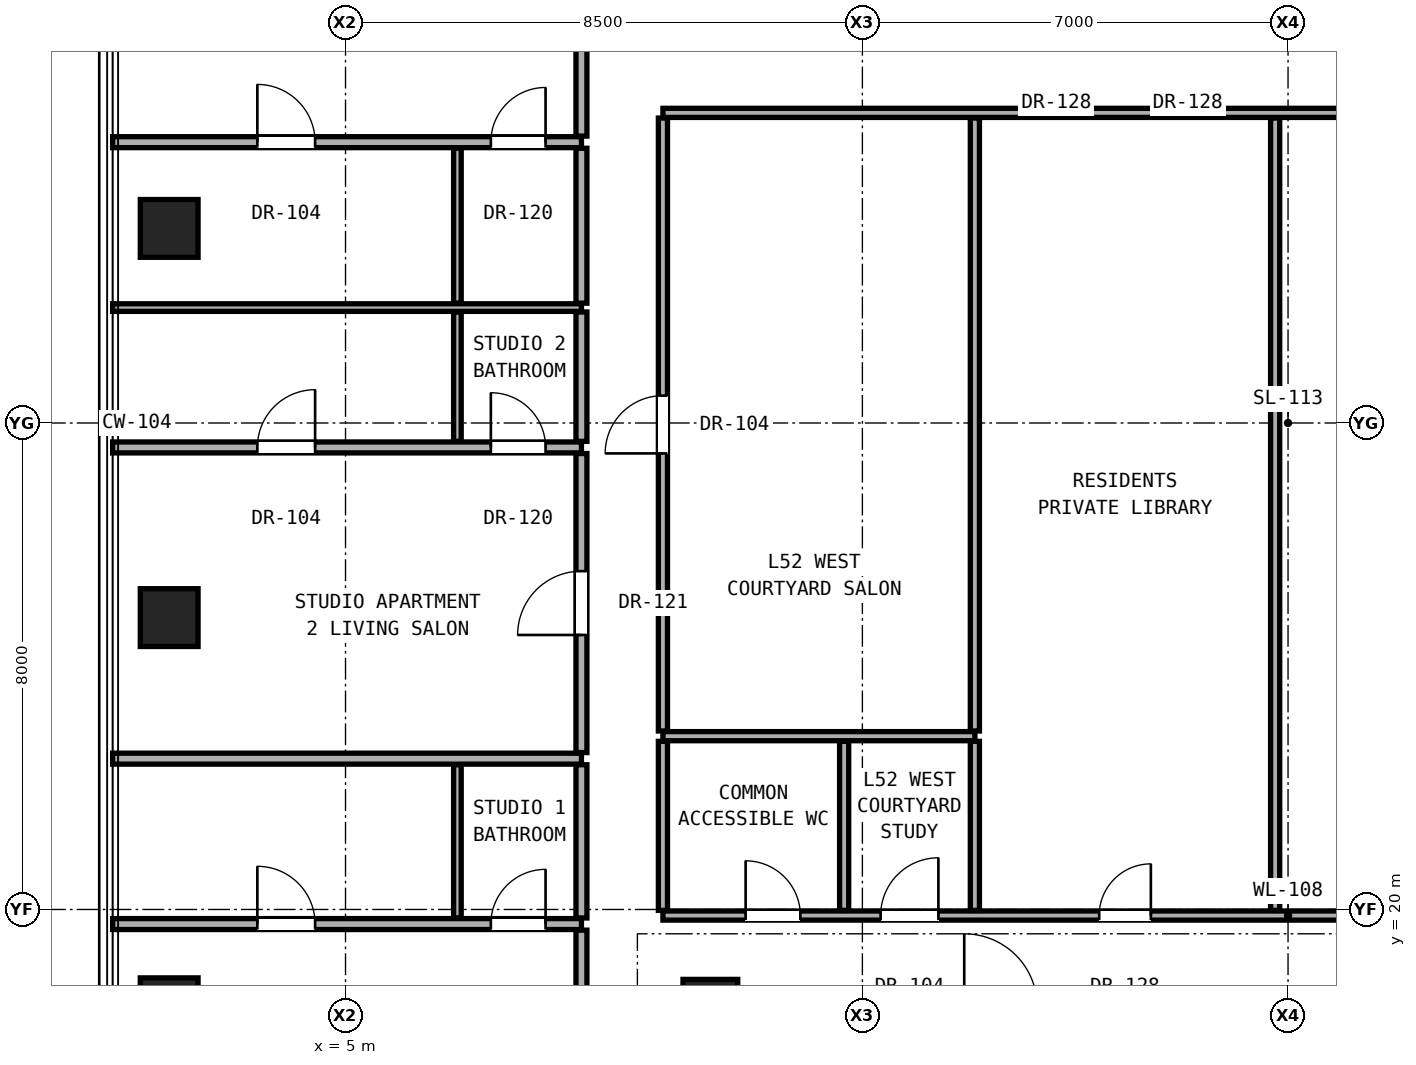
"""IFC4 building model, lengths in metres.
Left out: names, types, materials, properties, quantities, classifications, styles, units other than length and angle.
Written with IfcOpenShell. Run it as: python <this file> out.ifc"""

import sys

from ifc_helpers import new_model, si_unit, direction, frame, frame_2d, origin, origin_2d, place, context, subcontext, project, spatial, rectangle, hollow_rectangle, extrude, element, fill, save


model = new_model("IFC4")
c1 = context("Model", 3, precision=1e-05, world=origin(), true_north=direction((0.0, 1.0)))
c2 = subcontext(c1, "Body", "Model", "MODEL_VIEW")
j1 = project(units=[si_unit("LENGTHUNIT", "METRE"), si_unit("PLANEANGLEUNIT", "RADIAN")], contexts=[c1])
p1 = place(None, origin())
s1 = spatial("IfcSite", under=j1, at=p1, CompositionType="ELEMENT")
p2 = place(p1, origin())
s2 = spatial("IfcBuilding", under=s1, at=p2, CompositionType="ELEMENT")
p3 = place(p2, frame((0.0, 0.0, 183.65)))
s3 = spatial("IfcBuildingStorey", under=s2, at=p3, CompositionType="ELEMENT", Elevation=183.65)
p4 = place(p3, frame((11.0, 18.4, 0.0), z_axis=(0.0, 0.0, 1.0), x_axis=(1.0, 0.0, 0.0)))
e1 = element("IfcColumn", 1, at=p4, inside=s3, PredefinedType="COLUMN", context=c2, shape_type="SweptSolid", body=[
    extrude(rectangle(XDim=0.9, YDim=0.9, at=origin_2d()), origin(), (0.0, 0.0, 1.0), 3.25),
])
for number, where, z_axis, x_axis in (
    (2, (2.1, 18.4, 0.0), (0.0, 0.0, 1.0), (1.0, 0.0, 0.0)),
    (3, (2.1, 24.8, 0.0), (0.0, 0.0, 1.0), (1.0, 0.0, 0.0)),
    (4, (2.1, 31.2, 0.0), (0.0, 0.0, 1.0), (1.0, 0.0, 0.0)),
):
    element("IfcColumn", number, at=place(p3, frame(where, z_axis=z_axis, x_axis=x_axis)), inside=s3, PredefinedType="COLUMN", context=c2, shape_type="SweptSolid", body=[
        extrude(hollow_rectangle(XDim=0.95, YDim=0.95, WallThickness=0.05, at=origin_2d()), origin(), (0.0, 0.0, 1.0), 3.25),
    ])
p5 = place(p3, frame((1.17, 19.76, 0.0), z_axis=(0.0, 0.0, 1.0), x_axis=(1.0, 0.0, 0.0)))
e5 = element("IfcWall", 5, at=p5, inside=s3, PredefinedType="PARTITIONING", context=c2, shape_type="SweptSolid", body=[
    extrude(rectangle(XDim=7.71, YDim=0.18, at=frame_2d((3.855, 0.0))), origin(), (0.0, 0.0, 1.0), 2.269),
])
p6 = place(p5, frame((2.38, 0.0, 0.0)))
e6 = element("IfcOpeningElement", 6, at=p6, cuts=e5, PredefinedType="OPENING", context=c2, shape_type="SweptSolid", body=[
    extrude(rectangle(XDim=0.95, YDim=2.15, at=frame_2d((0.475, 1.075))), frame((0.0, 0.1, 0.0), z_axis=(0.0, -1.0, 0.0), x_axis=(1.0, 0.0, 0.0)), (0.0, 0.0, 1.0), 0.2),
])
p7 = place(p5, frame((6.22, 0.0, 0.0)))
e7 = element("IfcOpeningElement", 7, at=p7, cuts=e5, PredefinedType="OPENING", context=c2, shape_type="SweptSolid", body=[
    extrude(rectangle(XDim=0.9, YDim=2.1, at=frame_2d((0.45, 1.05))), frame((0.0, 0.1, 0.0), z_axis=(0.0, -1.0, 0.0), x_axis=(1.0, 0.0, 0.0)), (0.0, 0.0, 1.0), 0.2),
])
p8 = place(p3, frame((10.22, 19.9, 0.0), z_axis=(0.0, 0.0, 1.0), x_axis=(1.0, 0.0, 0.0)))
e8 = element("IfcWall", 8, at=p8, inside=s3, PredefinedType="PARTITIONING", context=c2, shape_type="SweptSolid", body=[
    extrude(rectangle(XDim=20.56, YDim=0.15, at=frame_2d((10.28, 0.0))), origin(), (0.0, 0.0, 1.0), 2.186),
])
p9 = place(p8, frame((1.36, 0.0, 0.0)))
e9 = element("IfcOpeningElement", 9, at=p9, cuts=e8, PredefinedType="OPENING", context=c2, shape_type="SweptSolid", body=[
    extrude(rectangle(XDim=0.9, YDim=2.1, at=frame_2d((0.45, 1.05))), frame((0.0, 0.085, 0.0), z_axis=(0.0, -1.0, 0.0), x_axis=(1.0, 0.0, 0.0)), (0.0, 0.0, 1.0), 0.17),
])
p10 = place(p8, frame((3.58, 0.0, 0.0)))
e10 = element("IfcOpeningElement", 10, at=p10, cuts=e8, PredefinedType="OPENING", context=c2, shape_type="SweptSolid", body=[
    extrude(rectangle(XDim=0.95, YDim=2.15, at=frame_2d((0.475, 1.075))), frame((0.0, 0.085, 0.0), z_axis=(0.0, -1.0, 0.0), x_axis=(1.0, 0.0, 0.0)), (0.0, 0.0, 1.0), 0.17),
])
p11 = place(p8, frame((7.174, 0.0, 0.0)))
e11 = element("IfcOpeningElement", 11, at=p11, cuts=e8, PredefinedType="OPENING", context=c2, shape_type="SweptSolid", body=[
    extrude(rectangle(XDim=0.85, YDim=2.01, at=frame_2d((0.425, 1.005))), frame((0.0, 0.085, 0.0), z_axis=(0.0, -1.0, 0.0), x_axis=(1.0, 0.0, 0.0)), (0.0, 0.0, 1.0), 0.17),
])
p12 = place(p3, frame((1.17, 22.48, 0.0), z_axis=(0.0, 0.0, 1.0), x_axis=(1.0, 0.0, 0.0)))
e12 = element("IfcWall", 12, at=p12, inside=s3, PredefinedType="PARTITIONING", context=c2, shape_type="SweptSolid", body=[
    extrude(rectangle(XDim=7.71, YDim=0.18, at=frame_2d((3.855, 0.0))), origin(), (0.0, 0.0, 1.0), 2.269),
])
p13 = place(p3, frame((10.22, 22.85, 0.0), z_axis=(0.0, 0.0, 1.0), x_axis=(1.0, 0.0, 0.0)))
e13 = element("IfcWall", 13, at=p13, inside=s3, PredefinedType="PARTITIONING", context=c2, shape_type="SweptSolid", body=[
    extrude(rectangle(XDim=5.13, YDim=0.15, at=frame_2d((2.565, 0.0))), origin(), (0.0, 0.0, 1.0), 2.186),
])
p14 = place(p3, frame((1.17, 27.598, 0.0), z_axis=(0.0, 0.0, 1.0), x_axis=(1.0, 0.0, 0.0)))
e14 = element("IfcWall", 14, at=p14, inside=s3, PredefinedType="PARTITIONING", context=c2, shape_type="SweptSolid", body=[
    extrude(rectangle(XDim=7.71, YDim=0.18, at=frame_2d((3.855, 0.0))), origin(), (0.0, 0.0, 1.0), 2.269),
])
p15 = place(p14, frame((2.38, 0.0, 0.0)))
e15 = element("IfcOpeningElement", 15, at=p15, cuts=e14, PredefinedType="OPENING", context=c2, shape_type="SweptSolid", body=[
    extrude(rectangle(XDim=0.95, YDim=2.15, at=frame_2d((0.475, 1.075))), frame((0.0, 0.1, 0.0), z_axis=(0.0, -1.0, 0.0), x_axis=(1.0, 0.0, 0.0)), (0.0, 0.0, 1.0), 0.2),
])
p16 = place(p14, frame((6.22, 0.0, 0.0)))
e16 = element("IfcOpeningElement", 16, at=p16, cuts=e14, PredefinedType="OPENING", context=c2, shape_type="SweptSolid", body=[
    extrude(rectangle(XDim=0.9, YDim=2.1, at=frame_2d((0.45, 1.05))), frame((0.0, 0.1, 0.0), z_axis=(0.0, -1.0, 0.0), x_axis=(1.0, 0.0, 0.0)), (0.0, 0.0, 1.0), 0.2),
])
p17 = place(p3, frame((1.17, 29.898, 0.0), z_axis=(0.0, 0.0, 1.0), x_axis=(1.0, 0.0, 0.0)))
e17 = element("IfcWall", 17, at=p17, inside=s3, PredefinedType="PARTITIONING", context=c2, shape_type="SweptSolid", body=[
    extrude(rectangle(XDim=7.71, YDim=0.125, at=frame_2d((3.855, 0.0))), origin(), (0.0, 0.0, 1.0), 2.269),
])
p18 = place(p3, frame((1.17, 32.618, 0.0), z_axis=(0.0, 0.0, 1.0), x_axis=(1.0, 0.0, 0.0)))
e18 = element("IfcWall", 18, at=p18, inside=s3, PredefinedType="PARTITIONING", context=c2, shape_type="SweptSolid", body=[
    extrude(rectangle(XDim=7.71, YDim=0.18, at=frame_2d((3.855, 0.0))), origin(), (0.0, 0.0, 1.0), 2.269),
])
p19 = place(p18, frame((2.38, 0.0, 0.0)))
e19 = element("IfcOpeningElement", 19, at=p19, cuts=e18, PredefinedType="OPENING", context=c2, shape_type="SweptSolid", body=[
    extrude(rectangle(XDim=0.95, YDim=2.15, at=frame_2d((0.475, 1.075))), frame((0.0, 0.1, 0.0), z_axis=(0.0, -1.0, 0.0), x_axis=(1.0, 0.0, 0.0)), (0.0, 0.0, 1.0), 0.2),
])
p20 = place(p18, frame((6.22, 0.0, 0.0)))
e20 = element("IfcOpeningElement", 20, at=p20, cuts=e18, PredefinedType="OPENING", context=c2, shape_type="SweptSolid", body=[
    extrude(rectangle(XDim=0.9, YDim=2.1, at=frame_2d((0.45, 1.05))), frame((0.0, 0.1, 0.0), z_axis=(0.0, -1.0, 0.0), x_axis=(1.0, 0.0, 0.0)), (0.0, 0.0, 1.0), 0.2),
])
p21 = place(p3, frame((10.22, 33.1, 0.0), z_axis=(0.0, 0.0, 1.0), x_axis=(1.0, 0.0, 0.0)))
e21 = element("IfcWall", 21, at=p21, inside=s3, PredefinedType="PARTITIONING", context=c2, shape_type="SweptSolid", body=[
    extrude(rectangle(XDim=20.56, YDim=0.15, at=frame_2d((10.28, 0.0))), origin(), (0.0, 0.0, 1.0), 2.186),
])
p22 = place(p21, frame((12.343, 0.0, 0.0)))
e22 = element("IfcOpeningElement", 22, at=p22, cuts=e21, PredefinedType="OPENING", context=c2, shape_type="SweptSolid", body=[
    extrude(rectangle(XDim=0.85, YDim=2.01, at=frame_2d((0.425, 1.005))), frame((0.0, 0.085, 0.0), z_axis=(0.0, -1.0, 0.0), x_axis=(1.0, 0.0, 0.0)), (0.0, 0.0, 1.0), 0.17),
])
p23 = place(p21, frame((17.569, 0.0, 0.0)))
e23 = element("IfcOpeningElement", 23, at=p23, cuts=e21, PredefinedType="OPENING", context=c2, shape_type="SweptSolid", body=[
    extrude(rectangle(XDim=0.85, YDim=2.01, at=frame_2d((0.425, 1.005))), frame((0.0, 0.085, 0.0), z_axis=(0.0, -1.0, 0.0), x_axis=(1.0, 0.0, 0.0)), (0.0, 0.0, 1.0), 0.17),
])
p24 = place(p3, frame((6.84, 19.86, 0.0), z_axis=(0.0, 0.0, 1.0), x_axis=(0.0, 1.0, 0.0)))
e24 = element("IfcWall", 24, at=p24, inside=s3, PredefinedType="PARTITIONING", context=c2, shape_type="SweptSolid", body=[
    extrude(rectangle(XDim=2.52, YDim=0.125, at=frame_2d((1.26, 0.0))), origin(), (0.0, 0.0, 1.0), 3.05),
])
p25 = place(p3, frame((6.84, 27.698, 0.0), z_axis=(0.0, 0.0, 1.0), x_axis=(0.0, 1.0, 0.0)))
e25 = element("IfcWall", 25, at=p25, inside=s3, PredefinedType="PARTITIONING", context=c2, shape_type="SweptSolid", body=[
    extrude(rectangle(XDim=2.127, YDim=0.125, at=frame_2d((1.064, 0.0))), origin(), (0.0, 0.0, 1.0), 3.05),
])
p26 = place(p3, frame((6.84, 29.97, 0.0), z_axis=(0.0, 0.0, 1.0), x_axis=(0.0, 1.0, 0.0)))
e26 = element("IfcWall", 26, at=p26, inside=s3, PredefinedType="PARTITIONING", context=c2, shape_type="SweptSolid", body=[
    extrude(rectangle(XDim=2.548, YDim=0.125, at=frame_2d((1.274, 0.0))), origin(), (0.0, 0.0, 1.0), 2.346),
])
p27 = place(p3, frame((8.88, 15.325, 0.0), z_axis=(0.0, 0.0, 1.0), x_axis=(0.0, 1.0, 0.0)))
e27 = element("IfcWall", 27, at=p27, inside=s3, PredefinedType="PARTITIONING", context=c2, shape_type="SweptSolid", body=[
    extrude(rectangle(XDim=4.335, YDim=0.18, at=frame_2d((2.167, 0.0))), origin(), (0.0, 0.0, 1.0), 2.442),
])
p28 = place(p27, frame((1.643, 0.0, 0.0)))
e28 = element("IfcOpeningElement", 28, at=p28, cuts=e27, PredefinedType="OPENING", context=c2, shape_type="SweptSolid", body=[
    extrude(rectangle(XDim=1.05, YDim=2.2, at=frame_2d((0.525, 1.1))), frame((0.0, 0.1, 0.0), z_axis=(0.0, -1.0, 0.0), x_axis=(1.0, 0.0, 0.0)), (0.0, 0.0, 1.0), 0.2),
])
p29 = place(p3, frame((8.88, 19.86, 0.0), z_axis=(0.0, 0.0, 1.0), x_axis=(0.0, 1.0, 0.0)))
e29 = element("IfcWall", 29, at=p29, inside=s3, PredefinedType="PARTITIONING", context=c2, shape_type="SweptSolid", body=[
    extrude(rectangle(XDim=2.52, YDim=0.18, at=frame_2d((1.26, 0.0))), origin(), (0.0, 0.0, 1.0), 3.05),
])
p30 = place(p3, frame((8.88, 22.58, 0.0), z_axis=(0.0, 0.0, 1.0), x_axis=(0.0, 1.0, 0.0)))
e30 = element("IfcWall", 30, at=p30, inside=s3, PredefinedType="PARTITIONING", context=c2, shape_type="SweptSolid", body=[
    extrude(rectangle(XDim=4.918, YDim=0.18, at=frame_2d((2.459, 0.0))), origin(), (0.0, 0.0, 1.0), 2.346),
])
p31 = place(p30, frame((1.934, 0.0, 0.0)))
e31 = element("IfcOpeningElement", 31, at=p31, cuts=e30, PredefinedType="OPENING", context=c2, shape_type="SweptSolid", body=[
    extrude(rectangle(XDim=1.05, YDim=2.2, at=frame_2d((0.525, 1.1))), frame((0.0, 0.1, 0.0), z_axis=(0.0, -1.0, 0.0), x_axis=(1.0, 0.0, 0.0)), (0.0, 0.0, 1.0), 0.2),
])
p32 = place(p3, frame((8.88, 27.698, 0.0), z_axis=(0.0, 0.0, 1.0), x_axis=(0.0, 1.0, 0.0)))
e32 = element("IfcWall", 32, at=p32, inside=s3, PredefinedType="PARTITIONING", context=c2, shape_type="SweptSolid", body=[
    extrude(rectangle(XDim=2.127, YDim=0.18, at=frame_2d((1.064, 0.0))), origin(), (0.0, 0.0, 1.0), 3.05),
])
p33 = place(p3, frame((8.88, 29.97, 0.0), z_axis=(0.0, 0.0, 1.0), x_axis=(0.0, 1.0, 0.0)))
e33 = element("IfcWall", 33, at=p33, inside=s3, PredefinedType="PARTITIONING", context=c2, shape_type="SweptSolid", body=[
    extrude(rectangle(XDim=2.548, YDim=0.18, at=frame_2d((1.274, 0.0))), origin(), (0.0, 0.0, 1.0), 2.346),
])
p34 = place(p3, frame((8.88, 32.718, 0.0), z_axis=(0.0, 0.0, 1.0), x_axis=(0.0, 1.0, 0.0)))
e34 = element("IfcWall", 34, at=p34, inside=s3, PredefinedType="PARTITIONING", context=c2, shape_type="SweptSolid", body=[
    extrude(rectangle(XDim=7.957, YDim=0.18, at=frame_2d((3.979, 0.0))), origin(), (0.0, 0.0, 1.0), 2.442),
])
p35 = place(p34, frame((3.454, 0.0, 0.0)))
e35 = element("IfcOpeningElement", 35, at=p35, cuts=e34, PredefinedType="OPENING", context=c2, shape_type="SweptSolid", body=[
    extrude(rectangle(XDim=1.05, YDim=2.2, at=frame_2d((0.525, 1.1))), frame((0.0, 0.1, 0.0), z_axis=(0.0, -1.0, 0.0), x_axis=(1.0, 0.0, 0.0)), (0.0, 0.0, 1.0), 0.2),
])
p36 = place(p3, frame((10.22, 19.985, 0.0), z_axis=(0.0, 0.0, 1.0), x_axis=(0.0, 1.0, 0.0)))
e36 = element("IfcWall", 36, at=p36, inside=s3, PredefinedType="PARTITIONING", context=c2, shape_type="SweptSolid", body=[
    extrude(rectangle(XDim=2.78, YDim=0.15, at=frame_2d((1.39, 0.0))), origin(), (0.0, 0.0, 1.0), 3.05),
])
p37 = place(p3, frame((10.22, 22.935, 0.0), z_axis=(0.0, 0.0, 1.0), x_axis=(0.0, 1.0, 0.0)))
e37 = element("IfcWall", 37, at=p37, inside=s3, PredefinedType="PARTITIONING", context=c2, shape_type="SweptSolid", body=[
    extrude(rectangle(XDim=10.08, YDim=0.15, at=frame_2d((5.04, 0.0))), origin(), (0.0, 0.0, 1.0), 2.346),
])
p38 = place(p37, frame((4.565, 0.0, 0.0)))
e38 = element("IfcOpeningElement", 38, at=p38, cuts=e37, PredefinedType="OPENING", context=c2, shape_type="SweptSolid", body=[
    extrude(rectangle(XDim=0.95, YDim=2.15, at=frame_2d((0.475, 1.075))), frame((0.0, 0.085, 0.0), z_axis=(0.0, -1.0, 0.0), x_axis=(1.0, 0.0, 0.0)), (0.0, 0.0, 1.0), 0.17),
])
for number, where, z_axis, x_axis in (
    (39, (13.2, 19.985, 0.0), (0.0, 0.0, 1.0), (0.0, 1.0, 0.0)),
    (40, (15.35, 19.985, 0.0), (0.0, 0.0, 1.0), (0.0, 1.0, 0.0)),
):
    element("IfcWall", number, at=place(p3, frame(where, z_axis=z_axis, x_axis=x_axis)), inside=s3, PredefinedType="PARTITIONING", context=c2, shape_type="SweptSolid", body=[
        extrude(rectangle(XDim=2.78, YDim=0.15, at=frame_2d((1.39, 0.0))), origin(), (0.0, 0.0, 1.0), 3.05),
    ])
p39 = place(p3, frame((15.35, 22.935, 0.0), z_axis=(0.0, 0.0, 1.0), x_axis=(0.0, 1.0, 0.0)))
e41 = element("IfcWall", 41, at=p39, inside=s3, PredefinedType="PARTITIONING", context=c2, shape_type="SweptSolid", body=[
    extrude(rectangle(XDim=10.08, YDim=0.15, at=frame_2d((5.04, 0.0))), origin(), (0.0, 0.0, 1.0), 2.186),
])
p40 = place(p3, frame((20.288, 19.985, 0.0), z_axis=(0.0, 0.0, 1.0), x_axis=(0.0, 1.0, 0.0)))
e42 = element("IfcWall", 42, at=p40, inside=s3, PredefinedType="PARTITIONING", context=c2, shape_type="SweptSolid", body=[
    extrude(rectangle(XDim=13.03, YDim=0.15, at=frame_2d((6.515, 0.0))), origin(), (0.0, 0.0, 1.0), 2.186),
])
p41 = place(p9, origin())
e43 = element("IfcDoor", 43, at=p41, inside=s3, OperationType="SINGLE_SWING_LEFT", PredefinedType="DOOR", context=c2, shape_type="SweptSolid", body=[
    extrude(rectangle(XDim=0.9, YDim=2.1, at=frame_2d((0.45, 1.05))), frame((0.0, 0.025, 0.0), z_axis=(0.0, -1.0, 0.0), x_axis=(1.0, 0.0, 0.0)), (0.0, 0.0, 1.0), 0.05),
])
fill(e9, e43)
p42 = place(p6, origin())
e44 = element("IfcDoor", 44, at=p42, inside=s3, OperationType="SINGLE_SWING_LEFT", PredefinedType="DOOR", context=c2, shape_type="SweptSolid", body=[
    extrude(rectangle(XDim=0.95, YDim=2.15, at=frame_2d((0.475, 1.075))), frame((0.0, 0.025, 0.0), z_axis=(0.0, -1.0, 0.0), x_axis=(1.0, 0.0, 0.0)), (0.0, 0.0, 1.0), 0.05),
])
fill(e6, e44)
p43 = place(p7, origin())
e45 = element("IfcDoor", 45, at=p43, inside=s3, OperationType="SINGLE_SWING_RIGHT", PredefinedType="DOOR", context=c2, shape_type="SweptSolid", body=[
    extrude(rectangle(XDim=0.9, YDim=2.1, at=frame_2d((0.45, 1.05))), frame((0.0, 0.025, 0.0), z_axis=(0.0, -1.0, 0.0), x_axis=(1.0, 0.0, 0.0)), (0.0, 0.0, 1.0), 0.05),
])
fill(e7, e45)
p44 = place(p31, origin())
e46 = element("IfcDoor", 46, at=p44, inside=s3, OperationType="SINGLE_SWING_LEFT", PredefinedType="DOOR", context=c2, shape_type="SweptSolid", body=[
    extrude(rectangle(XDim=1.05, YDim=2.2, at=frame_2d((0.525, 1.1))), frame((0.0, 0.025, 0.0), z_axis=(0.0, -1.0, 0.0), x_axis=(1.0, 0.0, 0.0)), (0.0, 0.0, 1.0), 0.05),
])
fill(e31, e46)
p45 = place(p15, origin())
e47 = element("IfcDoor", 47, at=p45, inside=s3, OperationType="SINGLE_SWING_RIGHT", PredefinedType="DOOR", context=c2, shape_type="SweptSolid", body=[
    extrude(rectangle(XDim=0.95, YDim=2.15, at=frame_2d((0.475, 1.075))), frame((0.0, 0.025, 0.0), z_axis=(0.0, -1.0, 0.0), x_axis=(1.0, 0.0, 0.0)), (0.0, 0.0, 1.0), 0.05),
])
fill(e15, e47)
p46 = place(p16, origin())
e48 = element("IfcDoor", 48, at=p46, inside=s3, OperationType="SINGLE_SWING_LEFT", PredefinedType="DOOR", context=c2, shape_type="SweptSolid", body=[
    extrude(rectangle(XDim=0.9, YDim=2.1, at=frame_2d((0.45, 1.05))), frame((0.0, 0.025, 0.0), z_axis=(0.0, -1.0, 0.0), x_axis=(1.0, 0.0, 0.0)), (0.0, 0.0, 1.0), 0.05),
])
fill(e16, e48)
p47 = place(p19, origin())
e49 = element("IfcDoor", 49, at=p47, inside=s3, OperationType="SINGLE_SWING_LEFT", PredefinedType="DOOR", context=c2, shape_type="SweptSolid", body=[
    extrude(rectangle(XDim=0.95, YDim=2.15, at=frame_2d((0.475, 1.075))), frame((0.0, 0.025, 0.0), z_axis=(0.0, -1.0, 0.0), x_axis=(1.0, 0.0, 0.0)), (0.0, 0.0, 1.0), 0.05),
])
fill(e19, e49)
p48 = place(p20, origin())
e50 = element("IfcDoor", 50, at=p48, inside=s3, OperationType="SINGLE_SWING_RIGHT", PredefinedType="DOOR", context=c2, shape_type="SweptSolid", body=[
    extrude(rectangle(XDim=0.9, YDim=2.1, at=frame_2d((0.45, 1.05))), frame((0.0, 0.025, 0.0), z_axis=(0.0, -1.0, 0.0), x_axis=(1.0, 0.0, 0.0)), (0.0, 0.0, 1.0), 0.05),
])
fill(e20, e50)
p49 = place(p10, origin())
e51 = element("IfcDoor", 51, at=p49, inside=s3, OperationType="SINGLE_SWING_RIGHT", PredefinedType="DOOR", context=c2, shape_type="SweptSolid", body=[
    extrude(rectangle(XDim=0.95, YDim=2.15, at=frame_2d((0.475, 1.075))), frame((0.0, 0.025, 0.0), z_axis=(0.0, -1.0, 0.0), x_axis=(1.0, 0.0, 0.0)), (0.0, 0.0, 1.0), 0.05),
])
fill(e10, e51)
p50 = place(p38, origin())
e52 = element("IfcDoor", 52, at=p50, inside=s3, OperationType="SINGLE_SWING_LEFT", PredefinedType="DOOR", context=c2, shape_type="SweptSolid", body=[
    extrude(rectangle(XDim=0.95, YDim=2.15, at=frame_2d((0.475, 1.075))), frame((0.0, 0.025, 0.0), z_axis=(0.0, -1.0, 0.0), x_axis=(1.0, 0.0, 0.0)), (0.0, 0.0, 1.0), 0.05),
])
fill(e38, e52)
p51 = place(p11, origin())
e53 = element("IfcDoor", 53, at=p51, inside=s3, OperationType="SINGLE_SWING_RIGHT", PredefinedType="DOOR", context=c2, shape_type="SweptSolid", body=[
    extrude(rectangle(XDim=0.85, YDim=2.01, at=frame_2d((0.425, 1.005))), frame((0.0, 0.025, 0.0), z_axis=(0.0, -1.0, 0.0), x_axis=(1.0, 0.0, 0.0)), (0.0, 0.0, 1.0), 0.05),
])
fill(e11, e53)
save(model, sys.argv[1])
